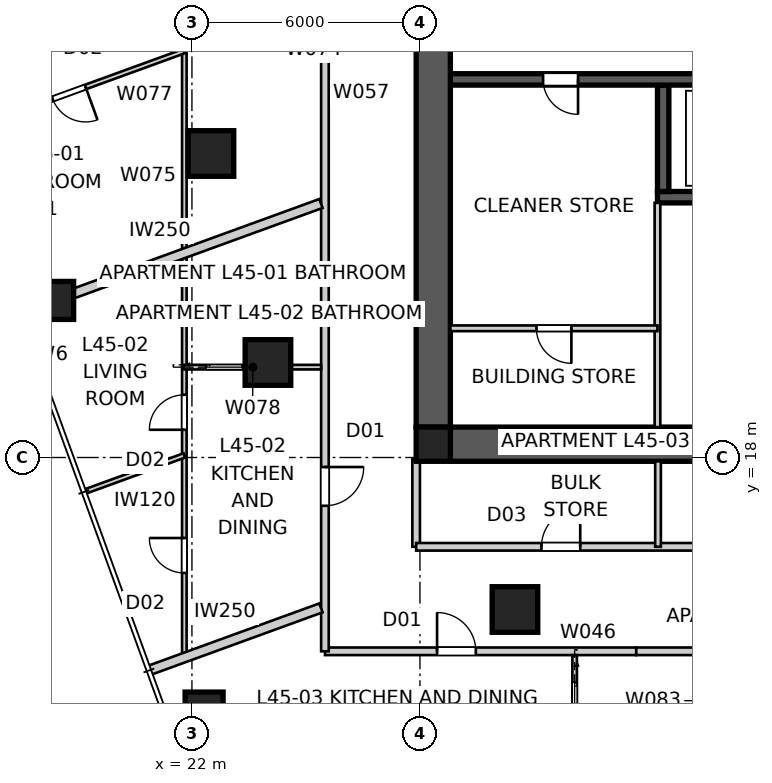
"""IFC4 building model, lengths in metres.
Left out: names, types, materials, properties, quantities, classifications, styles, units other than length and angle.
Written with IfcOpenShell. Run it as: python <this file> out.ifc"""

import sys

from ifc_helpers import new_model, si_unit, direction, frame, frame_2d, origin, origin_2d, place, context, subcontext, project, spatial, polyline, rectangle, outline, extrude, element, fill, save


model = new_model("IFC4")
c1 = context("Model", 3, precision=1e-05, world=origin(), true_north=direction((0.0, 1.0)))
c2 = subcontext(c1, "Body", "Model", "MODEL_VIEW")
j1 = project(units=[si_unit("LENGTHUNIT", "METRE"), si_unit("PLANEANGLEUNIT", "RADIAN")], contexts=[c1])
p1 = place(None, origin())
s1 = spatial("IfcSite", under=j1, at=p1, CompositionType="ELEMENT")
p2 = place(p1, origin())
s2 = spatial("IfcBuilding", under=s1, at=p2, CompositionType="ELEMENT")
p3 = place(p2, frame((0.0, 0.0, 164.2)))
s3 = spatial("IfcBuildingStorey", under=s2, at=p3, CompositionType="ELEMENT", Elevation=164.2)
p4 = place(p3, frame((51.2, 18.35, 0.0), z_axis=(0.0, 0.0, 1.0), x_axis=(-1.0, 0.0, 0.0)))
e1 = element("IfcWall", 1, at=p4, inside=s3, PredefinedType="SHEAR", context=c2, shape_type="SweptSolid", body=[
    extrude(outline(polyline([(0.0, -0.45), (22.4, -0.45), (22.4, -0.025), (22.85, -0.025), (22.85, 0.025), (22.4, 0.025), (22.4, 0.45), (0.0, 0.45), (0.0, 0.025), (-0.45, 0.025), (-0.45, -0.025), (0.0, -0.025), (0.0, -0.45)])), origin(), (0.0, 0.0, 1.0), 3.4),
])
p5 = place(p3, frame((28.35, 41.2, 0.0), z_axis=(0.0, 0.0, 1.0), x_axis=(0.0, -1.0, 0.0)))
e2 = element("IfcWall", 2, at=p5, inside=s3, PredefinedType="SHEAR", context=c2, shape_type="SweptSolid", body=[
    extrude(outline(polyline([(0.0, -0.45), (22.4, -0.45), (22.4, -0.025), (22.85, -0.025), (22.85, 0.025), (22.4, 0.025), (22.4, 0.45), (0.0, 0.45), (0.0, 0.025), (-0.45, 0.025), (-0.45, -0.025), (0.0, -0.025), (0.0, -0.45)])), origin(), (0.0, 0.0, 1.0), 3.4),
])
p6 = place(p5, frame((11.14, 0.0, 0.0)))
e3 = element("IfcOpeningElement", 3, at=p6, cuts=e2, PredefinedType="OPENING", context=c2, shape_type="SweptSolid", body=[
    extrude(rectangle(XDim=1.02, YDim=2.4, at=frame_2d((0.51, 1.2))), frame((0.0, 0.46, 0.0), z_axis=(0.0, -1.0, 0.0), x_axis=(1.0, 0.0, 0.0)), (0.0, 0.0, 1.0), 0.92),
])
p7 = place(p3, frame((51.2, 27.95, 0.0), z_axis=(0.0, 0.0, 1.0), x_axis=(-1.0, 0.0, 0.0)))
e4 = element("IfcWall", 4, at=p7, inside=s3, PredefinedType="SHEAR", context=c2, shape_type="SweptSolid", body=[
    extrude(rectangle(XDim=22.4, YDim=0.3, at=frame_2d((11.2, 0.0))), origin(), (0.0, 0.0, 1.0), 3.4),
])
p8 = place(p7, frame((19.04, 0.0, 0.0)))
e5 = element("IfcOpeningElement", 5, at=p8, cuts=e4, PredefinedType="OPENING", context=c2, shape_type="SweptSolid", body=[
    extrude(rectangle(XDim=0.92, YDim=2.1, at=frame_2d((0.46, 1.05))), frame((0.0, 0.16, 0.0), z_axis=(0.0, -1.0, 0.0), x_axis=(1.0, 0.0, 0.0)), (0.0, 0.0, 1.0), 0.32),
])
p9 = place(p7, frame((1.265, 0.0, 0.0)))
e6 = element("IfcOpeningElement", 6, at=p9, cuts=e4, PredefinedType="OPENING", context=c2, shape_type="SweptSolid", body=[
    extrude(rectangle(XDim=1.02, YDim=2.1, at=frame_2d((0.51, 1.05))), frame((0.0, 0.16, 0.0), z_axis=(0.0, -1.0, 0.0), x_axis=(1.0, 0.0, 0.0)), (0.0, 0.0, 1.0), 0.32),
])
p10 = place(p7, frame((4.015, 0.0, 0.0)))
e7 = element("IfcOpeningElement", 7, at=p10, cuts=e4, PredefinedType="OPENING", context=c2, shape_type="SweptSolid", body=[
    extrude(rectangle(XDim=0.92, YDim=2.1, at=frame_2d((0.46, 1.05))), frame((0.0, 0.16, 0.0), z_axis=(0.0, -1.0, 0.0), x_axis=(1.0, 0.0, 0.0)), (0.0, 0.0, 1.0), 0.32),
])
p11 = place(p7, frame((6.45, 0.0, 0.0)))
e8 = element("IfcOpeningElement", 8, at=p11, cuts=e4, PredefinedType="OPENING", context=c2, shape_type="SweptSolid", body=[
    extrude(rectangle(XDim=1.1, YDim=2.1, at=frame_2d((0.55, 1.05))), frame((0.0, 0.16, 0.0), z_axis=(0.0, -1.0, 0.0), x_axis=(1.0, 0.0, 0.0)), (0.0, 0.0, 1.0), 0.32),
])
p12 = place(p7, frame((9.25, 0.0, 0.0)))
e9 = element("IfcOpeningElement", 9, at=p12, cuts=e4, PredefinedType="OPENING", context=c2, shape_type="SweptSolid", body=[
    extrude(rectangle(XDim=1.1, YDim=2.1, at=frame_2d((0.55, 1.05))), frame((0.0, 0.16, 0.0), z_axis=(0.0, -1.0, 0.0), x_axis=(1.0, 0.0, 0.0)), (0.0, 0.0, 1.0), 0.32),
])
p13 = place(p7, frame((14.85, 0.0, 0.0)))
e10 = element("IfcOpeningElement", 10, at=p13, cuts=e4, PredefinedType="OPENING", context=c2, shape_type="SweptSolid", body=[
    extrude(rectangle(XDim=1.1, YDim=2.1, at=frame_2d((0.55, 1.05))), frame((0.0, 0.16, 0.0), z_axis=(0.0, -1.0, 0.0), x_axis=(1.0, 0.0, 0.0)), (0.0, 0.0, 1.0), 0.32),
])
p14 = place(p3, frame((45.75, 24.85, 0.0), z_axis=(0.0, 0.0, 1.0), x_axis=(-1.0, 0.0, 0.0)))
e11 = element("IfcWall", 11, at=p14, inside=s3, PredefinedType="SHEAR", context=c2, shape_type="SweptSolid", body=[
    extrude(rectangle(XDim=11.5, YDim=0.3, at=frame_2d((5.75, 0.0))), origin(), (0.0, 0.0, 1.0), 3.4),
])
p15 = place(p3, frame((34.4, 27.8, 0.0), z_axis=(0.0, 0.0, 1.0), x_axis=(0.0, -1.0, 0.0)))
e12 = element("IfcWall", 12, at=p15, inside=s3, PredefinedType="SHEAR", context=c2, shape_type="SweptSolid", body=[
    extrude(rectangle(XDim=2.8, YDim=0.3, at=frame_2d((1.4, 0.0))), origin(), (0.0, 0.0, 1.0), 3.4),
])
p16 = place(p3, frame((28.35, 18.35, 0.0), z_axis=(0.0, 0.0, 1.0), x_axis=(1.0, 0.0, 0.0)))
e13 = element("IfcColumn", 13, at=p16, inside=s3, PredefinedType="COLUMN", context=c2, shape_type="SweptSolid", body=[
    extrude(rectangle(XDim=0.9, YDim=0.9, at=origin_2d()), origin(), (0.0, 0.0, 1.0), 3.4),
])
for number, where, z_axis, x_axis in (
    (14, (18.387, 22.134, 0.0), (0.0, 0.0, 1.0), (1.0, 0.0, 0.0)),
    (15, (22.32, 11.327, 0.0), (0.0, 0.0, 1.0), (1.0, 0.0, 0.0)),
):
    element("IfcColumn", number, at=place(p3, frame(where, z_axis=z_axis, x_axis=x_axis)), inside=s3, PredefinedType="COLUMN", context=c2, shape_type="SweptSolid", body=[
        extrude(rectangle(XDim=1.0, YDim=1.0, at=origin_2d()), origin(), (0.0, 0.0, 1.0), 3.4),
    ])
for number, where, z_axis, x_axis in (
    (16, (22.5, 26.0, 0.0), (0.0, 0.0, 1.0), (1.0, 0.0, 0.0)),
    (17, (24.0, 20.5, 0.0), (0.0, 0.0, 1.0), (1.0, 0.0, 0.0)),
    (18, (30.5, 14.0, 0.0), (0.0, 0.0, 1.0), (1.0, 0.0, 0.0)),
):
    element("IfcColumn", number, at=place(p3, frame(where, z_axis=z_axis, x_axis=x_axis)), inside=s3, PredefinedType="COLUMN", context=c2, shape_type="SweptSolid", body=[
        extrude(rectangle(XDim=1.2, YDim=1.2, at=origin_2d()), origin(), (0.0, 0.0, 1.0), 3.4),
    ])
p17 = place(p3, frame((25.5, 12.9, 0.0), z_axis=(0.0, 0.0, 1.0), x_axis=(1.0, 0.0, 0.0)))
e19 = element("IfcWall", 19, at=p17, inside=s3, PredefinedType="PARTITIONING", context=c2, shape_type="SweptSolid", body=[
    extrude(rectangle(XDim=8.192, YDim=0.2, at=frame_2d((4.096, 0.0))), origin(), (0.0, 0.0, 1.0), 3.25),
])
p18 = place(p17, frame((2.95, 0.0, 0.0)))
e20 = element("IfcOpeningElement", 20, at=p18, cuts=e19, PredefinedType="OPENING", context=c2, shape_type="SweptSolid", body=[
    extrude(rectangle(XDim=1.02, YDim=2.34, at=frame_2d((0.51, 1.17))), frame((0.0, 0.11, 0.0), z_axis=(0.0, -1.0, 0.0), x_axis=(1.0, 0.0, 0.0)), (0.0, 0.0, 1.0), 0.22),
])
p19 = place(p3, frame((33.692, 12.9, 0.0), z_axis=(0.0, 0.0, 1.0), x_axis=(1.0, 0.0, 0.0)))
e21 = element("IfcWall", 21, at=p19, inside=s3, PredefinedType="PARTITIONING", context=c2, shape_type="SweptSolid", body=[
    extrude(rectangle(XDim=1.683, YDim=0.2, at=frame_2d((0.842, 0.0))), origin(), (0.0, 0.0, 1.0), 2.55),
])
p20 = place(p3, frame((25.5, 46.7, 0.0), z_axis=(0.0, 0.0, 1.0), x_axis=(0.0, -1.0, 0.0)))
e22 = element("IfcWall", 22, at=p20, inside=s3, PredefinedType="PARTITIONING", context=c2, shape_type="SweptSolid", body=[
    extrude(rectangle(XDim=33.8, YDim=0.2, at=frame_2d((16.9, 0.0))), origin(), (0.0, 0.0, 1.0), 3.25),
])
p21 = place(p20, frame((28.951, 0.0, 0.0)))
e23 = element("IfcOpeningElement", 23, at=p21, cuts=e22, PredefinedType="OPENING", context=c2, shape_type="SweptSolid", body=[
    extrude(rectangle(XDim=1.02, YDim=2.34, at=frame_2d((0.51, 1.17))), frame((0.0, 0.11, 0.0), z_axis=(0.0, -1.0, 0.0), x_axis=(1.0, 0.0, 0.0)), (0.0, 0.0, 1.0), 0.22),
])
p22 = place(p20, frame((13.881, 0.0, 0.0)))
e24 = element("IfcOpeningElement", 24, at=p22, cuts=e22, PredefinedType="OPENING", context=c2, shape_type="SweptSolid", body=[
    extrude(rectangle(XDim=1.02, YDim=2.34, at=frame_2d((0.51, 1.17))), frame((0.0, 0.11, 0.0), z_axis=(0.0, -1.0, 0.0), x_axis=(1.0, 0.0, 0.0)), (0.0, 0.0, 1.0), 0.22),
])
p23 = place(p20, frame((1.97, 0.0, 0.0)))
e25 = element("IfcOpeningElement", 25, at=p23, cuts=e22, PredefinedType="OPENING", context=c2, shape_type="SweptSolid", body=[
    extrude(rectangle(XDim=1.02, YDim=2.34, at=frame_2d((0.51, 1.17))), frame((0.0, 0.11, 0.0), z_axis=(0.0, -1.0, 0.0), x_axis=(1.0, 0.0, 0.0)), (0.0, 0.0, 1.0), 0.22),
])
p24 = place(p3, frame((17.447, 21.792, 0.0), z_axis=(0.0, 0.0, 1.0), x_axis=(0.939695617736, 0.342011909161, 0.0)))
e26 = element("IfcWall", 26, at=p24, inside=s3, PredefinedType="PARTITIONING", context=c2, shape_type="SweptSolid", body=[
    extrude(rectangle(XDim=8.458, YDim=0.25, at=frame_2d((4.229, 0.0))), origin(), (0.0, 0.0, 1.0), 3.25),
])
p25 = place(p3, frame((20.868, 12.395, 0.0), z_axis=(0.0, 0.0, 1.0), x_axis=(0.939677962656, 0.342060413521, 0.0)))
e27 = element("IfcWall", 27, at=p25, inside=s3, PredefinedType="PARTITIONING", context=c2, shape_type="SweptSolid", body=[
    extrude(rectangle(XDim=4.818, YDim=0.25, at=frame_2d((2.409, 0.0))), origin(), (0.0, 0.0, 1.0), 3.25),
])
p26 = place(p3, frame((34.25, 18.8, 0.0), z_axis=(0.0, 0.0, 1.0), x_axis=(0.0, 1.0, 0.0)))
e28 = element("IfcWall", 28, at=p26, inside=s3, PredefinedType="SOLIDWALL", context=c2, shape_type="SweptSolid", body=[
    extrude(rectangle(XDim=5.9, YDim=0.15, at=frame_2d((2.95, 0.0))), origin(), (0.0, 0.0, 1.0), 3.25),
])
p27 = place(p3, frame((34.25, 21.4, 0.0), z_axis=(0.0, 0.0, 1.0), x_axis=(-1.0, 0.0, 0.0)))
e29 = element("IfcWall", 29, at=p27, inside=s3, PredefinedType="SOLIDWALL", context=c2, shape_type="SweptSolid", body=[
    extrude(rectangle(XDim=5.45, YDim=0.15, at=frame_2d((2.725, 0.0))), origin(), (0.0, 0.0, 1.0), 3.25),
])
p28 = place(p27, frame((2.265, 0.0, 0.0)))
e30 = element("IfcOpeningElement", 30, at=p28, cuts=e29, PredefinedType="OPENING", context=c2, shape_type="SweptSolid", body=[
    extrude(rectangle(XDim=0.92, YDim=2.1, at=frame_2d((0.46, 1.05))), frame((0.0, 0.085, 0.0), z_axis=(0.0, -1.0, 0.0), x_axis=(1.0, 0.0, 0.0)), (0.0, 0.0, 1.0), 0.17),
])
p29 = place(p3, frame((27.9, 17.95, 0.0), z_axis=(0.0, 0.0, 1.0), x_axis=(0.0, -1.0, 0.0)))
e31 = element("IfcWall", 31, at=p29, inside=s3, PredefinedType="PARTITIONING", context=c2, shape_type="SweptSolid", body=[
    extrude(rectangle(XDim=2.3, YDim=0.2, at=frame_2d((1.15, 0.0))), origin(), (0.0, 0.0, 1.0), 3.25),
])
p30 = place(p3, frame((27.9, 15.65, 0.0), z_axis=(0.0, 0.0, 1.0), x_axis=(1.0, 0.0, 0.0)))
e32 = element("IfcWall", 32, at=p30, inside=s3, PredefinedType="PARTITIONING", context=c2, shape_type="SweptSolid", body=[
    extrude(rectangle(XDim=24.2, YDim=0.2, at=frame_2d((12.1, 0.0))), origin(), (0.0, 0.0, 1.0), 3.25),
])
p31 = place(p30, frame((10.743, 0.0, 0.0)))
e33 = element("IfcOpeningElement", 33, at=p31, cuts=e32, PredefinedType="OPENING", context=c2, shape_type="SweptSolid", body=[
    extrude(rectangle(XDim=1.02, YDim=2.1, at=frame_2d((0.51, 1.05))), frame((0.0, 0.11, 0.0), z_axis=(0.0, -1.0, 0.0), x_axis=(1.0, 0.0, 0.0)), (0.0, 0.0, 1.0), 0.22),
])
p32 = place(p30, frame((19.636, 0.0, 0.0)))
e34 = element("IfcOpeningElement", 34, at=p32, cuts=e32, PredefinedType="OPENING", context=c2, shape_type="SweptSolid", body=[
    extrude(rectangle(XDim=1.02, YDim=2.1, at=frame_2d((0.51, 1.05))), frame((0.0, 0.11, 0.0), z_axis=(0.0, -1.0, 0.0), x_axis=(1.0, 0.0, 0.0)), (0.0, 0.0, 1.0), 0.22),
])
p33 = place(p30, frame((3.297, 0.0, 0.0)))
e35 = element("IfcOpeningElement", 35, at=p33, cuts=e32, PredefinedType="OPENING", context=c2, shape_type="SweptSolid", body=[
    extrude(rectangle(XDim=1.02, YDim=2.1, at=frame_2d((0.51, 1.05))), frame((0.0, 0.11, 0.0), z_axis=(0.0, -1.0, 0.0), x_axis=(1.0, 0.0, 0.0)), (0.0, 0.0, 1.0), 0.22),
])
p34 = place(p3, frame((34.265, 15.65, 0.0), z_axis=(0.0, 0.0, 1.0), x_axis=(0.0, 1.0, 0.0)))
e36 = element("IfcWall", 36, at=p34, inside=s3, PredefinedType="SOLIDWALL", context=c2, shape_type="SweptSolid", body=[
    extrude(rectangle(XDim=2.25, YDim=0.15, at=frame_2d((1.125, 0.0))), origin(), (0.0, 0.0, 1.0), 2.796),
])
p35 = place(p3, frame((21.8, 12.734, 0.0), z_axis=(0.0, 0.0, 1.0), x_axis=(0.0, 1.0, 0.0)))
e37 = element("IfcWall", 37, at=p35, inside=s3, PredefinedType="PARTITIONING", context=c2, shape_type="SweptSolid", body=[
    extrude(rectangle(XDim=29.357, YDim=0.12, at=frame_2d((14.678, 0.0))), origin(), (0.0, 0.0, 1.0), 3.25),
])
p36 = place(p35, frame((2.227, 0.0, 0.0)))
e38 = element("IfcOpeningElement", 38, at=p36, cuts=e37, PredefinedType="OPENING", context=c2, shape_type="SweptSolid", body=[
    extrude(rectangle(XDim=0.92, YDim=2.34, at=frame_2d((0.46, 1.17))), frame((0.0, 0.07, 0.0), z_axis=(0.0, -1.0, 0.0), x_axis=(1.0, 0.0, 0.0)), (0.0, 0.0, 1.0), 0.14),
])
p37 = place(p35, frame((5.996, 0.0, 0.0)))
e39 = element("IfcOpeningElement", 39, at=p37, cuts=e37, PredefinedType="OPENING", context=c2, shape_type="SweptSolid", body=[
    extrude(rectangle(XDim=0.92, YDim=2.34, at=frame_2d((0.46, 1.17))), frame((0.0, 0.07, 0.0), z_axis=(0.0, -1.0, 0.0), x_axis=(1.0, 0.0, 0.0)), (0.0, 0.0, 1.0), 0.14),
])
p38 = place(p35, frame((18.415, 0.0, 0.0)))
e40 = element("IfcOpeningElement", 40, at=p38, cuts=e37, PredefinedType="OPENING", context=c2, shape_type="SweptSolid", body=[
    extrude(rectangle(XDim=0.92, YDim=2.34, at=frame_2d((0.46, 1.17))), frame((0.0, 0.07, 0.0), z_axis=(0.0, -1.0, 0.0), x_axis=(1.0, 0.0, 0.0)), (0.0, 0.0, 1.0), 0.14),
])
p39 = place(p35, frame((26.769, 0.0, 0.0)))
e41 = element("IfcOpeningElement", 41, at=p39, cuts=e37, PredefinedType="OPENING", context=c2, shape_type="SweptSolid", body=[
    extrude(rectangle(XDim=0.96, YDim=2.1, at=frame_2d((0.48, 1.05))), frame((0.0, 0.07, 0.0), z_axis=(0.0, -1.0, 0.0), x_axis=(1.0, 0.0, 0.0)), (0.0, 0.0, 1.0), 0.14),
])
p40 = place(p3, frame((21.8, 28.697, 0.0), z_axis=(0.0, 0.0, 1.0), x_axis=(-0.939697777766, -0.342005974306, 0.0)))
e42 = element("IfcWall", 42, at=p40, inside=s3, PredefinedType="PARTITIONING", context=c2, shape_type="SweptSolid", body=[
    extrude(rectangle(XDim=6.412, YDim=0.12, at=frame_2d((3.206, 0.0))), origin(), (0.0, 0.0, 1.0), 3.25),
])
p41 = place(p40, frame((2.766, 0.0, 0.0)))
e43 = element("IfcOpeningElement", 43, at=p41, cuts=e42, PredefinedType="OPENING", context=c2, shape_type="SweptSolid", body=[
    extrude(rectangle(XDim=0.92, YDim=2.34, at=frame_2d((0.46, 1.17))), frame((0.0, 0.07, 0.0), z_axis=(0.0, -1.0, 0.0), x_axis=(1.0, 0.0, 0.0)), (0.0, 0.0, 1.0), 0.14),
])
p42 = place(p3, frame((21.8, 20.378, 0.0), z_axis=(0.0, 0.0, 1.0), x_axis=(1.0, 0.0, 0.0)))
e44 = element("IfcWall", 44, at=p42, inside=s3, PredefinedType="PARTITIONING", context=c2, shape_type="SweptSolid", body=[
    extrude(rectangle(XDim=3.6, YDim=0.12, at=frame_2d((1.8, 0.0))), origin(), (0.0, 0.0, 1.0), 3.25),
])
p43 = place(p42, frame((0.57, 0.0, 0.0)))
e45 = element("IfcOpeningElement", 45, at=p43, cuts=e44, PredefinedType="OPENING", context=c2, shape_type="SweptSolid", body=[
    extrude(rectangle(XDim=0.96, YDim=2.1, at=frame_2d((0.48, 1.05))), frame((0.0, 0.07, 0.0), z_axis=(0.0, -1.0, 0.0), x_axis=(1.0, 0.0, 0.0)), (0.0, 0.0, 1.0), 0.14),
])
p44 = place(p3, frame((21.8, 18.055, 0.0), z_axis=(0.0, 0.0, 1.0), x_axis=(-0.939680234176, -0.34205417334, 0.0)))
e46 = element("IfcWall", 46, at=p44, inside=s3, PredefinedType="PARTITIONING", context=c2, shape_type="SweptSolid", body=[
    extrude(rectangle(XDim=2.772, YDim=0.12, at=frame_2d((1.386, 0.0))), origin(), (0.0, 0.0, 1.0), 3.25),
])
p45 = place(p3, frame((32.071, 12.8, 0.0), z_axis=(0.0, 0.0, 1.0), x_axis=(0.0, -1.0, 0.0)))
e47 = element("IfcWall", 47, at=p45, inside=s3, PredefinedType="PARTITIONING", context=c2, shape_type="SweptSolid", body=[
    extrude(rectangle(XDim=2.4, YDim=0.12, at=frame_2d((1.2, 0.0))), origin(), (0.0, 0.0, 1.0), 3.25),
])
p46 = place(p45, frame((0.72, 0.0, 0.0)))
e48 = element("IfcOpeningElement", 48, at=p46, cuts=e47, PredefinedType="OPENING", context=c2, shape_type="SweptSolid", body=[
    extrude(rectangle(XDim=0.96, YDim=2.1, at=frame_2d((0.48, 1.05))), frame((0.0, 0.07, 0.0), z_axis=(0.0, -1.0, 0.0), x_axis=(1.0, 0.0, 0.0)), (0.0, 0.0, 1.0), 0.14),
])
p47 = place(p8, origin())
e49 = element("IfcDoor", 49, at=p47, inside=s3, OperationType="SINGLE_SWING_LEFT", PredefinedType="DOOR", context=c2, shape_type="SweptSolid", body=[
    extrude(rectangle(XDim=0.92, YDim=2.1, at=frame_2d((0.46, 1.05))), frame((0.0, 0.025, 0.0), z_axis=(0.0, -1.0, 0.0), x_axis=(1.0, 0.0, 0.0)), (0.0, 0.0, 1.0), 0.05),
])
fill(e5, e49)
p48 = place(p21, origin())
e50 = element("IfcDoor", 50, at=p48, inside=s3, OperationType="SINGLE_SWING_LEFT", PredefinedType="DOOR", context=c2, shape_type="SweptSolid", body=[
    extrude(rectangle(XDim=1.02, YDim=2.34, at=frame_2d((0.51, 1.17))), frame((0.0, 0.025, 0.0), z_axis=(0.0, -1.0, 0.0), x_axis=(1.0, 0.0, 0.0)), (0.0, 0.0, 1.0), 0.05),
])
fill(e23, e50)
p49 = place(p18, origin())
e51 = element("IfcDoor", 51, at=p49, inside=s3, OperationType="SINGLE_SWING_LEFT", PredefinedType="DOOR", context=c2, shape_type="SweptSolid", body=[
    extrude(rectangle(XDim=1.02, YDim=2.34, at=frame_2d((0.51, 1.17))), frame((0.0, 0.025, 0.0), z_axis=(0.0, -1.0, 0.0), x_axis=(1.0, 0.0, 0.0)), (0.0, 0.0, 1.0), 0.05),
])
fill(e20, e51)
p50 = place(p33, origin())
e52 = element("IfcDoor", 52, at=p50, inside=s3, OperationType="SINGLE_SWING_RIGHT", PredefinedType="DOOR", context=c2, shape_type="SweptSolid", body=[
    extrude(rectangle(XDim=1.02, YDim=2.1, at=frame_2d((0.51, 1.05))), frame((0.0, 0.025, 0.0), z_axis=(0.0, -1.0, 0.0), x_axis=(1.0, 0.0, 0.0)), (0.0, 0.0, 1.0), 0.05),
])
fill(e35, e52)
p51 = place(p28, origin())
e53 = element("IfcDoor", 53, at=p51, inside=s3, OperationType="SINGLE_SWING_LEFT", PredefinedType="DOOR", context=c2, shape_type="SweptSolid", body=[
    extrude(rectangle(XDim=0.92, YDim=2.1, at=frame_2d((0.46, 1.05))), frame((0.0, 0.025, 0.0), z_axis=(0.0, -1.0, 0.0), x_axis=(1.0, 0.0, 0.0)), (0.0, 0.0, 1.0), 0.05),
])
fill(e30, e53)
p52 = place(p36, origin())
e54 = element("IfcDoor", 54, at=p52, inside=s3, OperationType="SINGLE_SWING_RIGHT", PredefinedType="DOOR", context=c2, shape_type="SweptSolid", body=[
    extrude(rectangle(XDim=0.92, YDim=2.34, at=frame_2d((0.46, 1.17))), frame((0.0, 0.025, 0.0), z_axis=(0.0, -1.0, 0.0), x_axis=(1.0, 0.0, 0.0)), (0.0, 0.0, 1.0), 0.05),
])
fill(e38, e54)
p53 = place(p43, origin())
e55 = element("IfcDoor", 55, at=p53, inside=s3, OperationType="SLIDING_TO_LEFT", PredefinedType="DOOR", context=c2, shape_type="SweptSolid", body=[
    extrude(rectangle(XDim=0.96, YDim=2.1, at=frame_2d((0.48, 1.05))), frame((0.0, 0.025, 0.0), z_axis=(0.0, -1.0, 0.0), x_axis=(1.0, 0.0, 0.0)), (0.0, 0.0, 1.0), 0.05),
])
fill(e45, e55)
p54 = place(p37, origin())
e56 = element("IfcDoor", 56, at=p54, inside=s3, OperationType="SINGLE_SWING_LEFT", PredefinedType="DOOR", context=c2, shape_type="SweptSolid", body=[
    extrude(rectangle(XDim=0.92, YDim=2.34, at=frame_2d((0.46, 1.17))), frame((0.0, 0.025, 0.0), z_axis=(0.0, -1.0, 0.0), x_axis=(1.0, 0.0, 0.0)), (0.0, 0.0, 1.0), 0.05),
])
fill(e39, e56)
p55 = place(p46, origin())
e57 = element("IfcDoor", 57, at=p55, inside=s3, OperationType="SLIDING_TO_LEFT", PredefinedType="DOOR", context=c2, shape_type="SweptSolid", body=[
    extrude(rectangle(XDim=0.96, YDim=2.1, at=frame_2d((0.48, 1.05))), frame((0.0, 0.025, 0.0), z_axis=(0.0, -1.0, 0.0), x_axis=(1.0, 0.0, 0.0)), (0.0, 0.0, 1.0), 0.05),
])
fill(e48, e57)
p56 = place(p41, origin())
e58 = element("IfcDoor", 58, at=p56, inside=s3, OperationType="SINGLE_SWING_LEFT", PredefinedType="DOOR", context=c2, shape_type="SweptSolid", body=[
    extrude(rectangle(XDim=0.92, YDim=2.34, at=frame_2d((0.46, 1.17))), frame((0.0, 0.025, 0.0), z_axis=(0.0, -1.0, 0.0), x_axis=(1.0, 0.0, 0.0)), (0.0, 0.0, 1.0), 0.05),
])
fill(e43, e58)
save(model, sys.argv[1])
